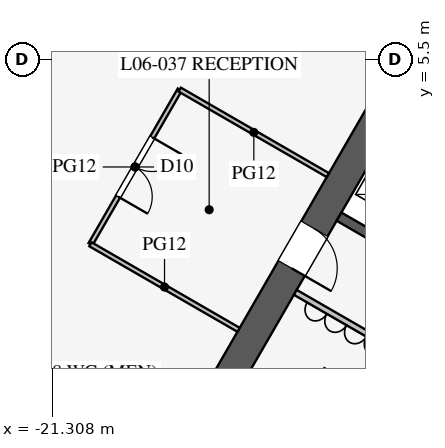
"""IFC4 building model, lengths in metres.
Left out: names, types, materials, properties, quantities, classifications, styles, units other than length and angle.
Written with IfcOpenShell. Run it as: python <this file> out.ifc"""

import sys

from ifc_helpers import new_model, si_unit, direction, frame, frame_2d, origin, place, context, subcontext, project, spatial, rectangle, extrude, element, fill, save


model = new_model("IFC4")
c1 = context("Model", 3, precision=1e-05, world=origin(), true_north=direction((0.0, 1.0)))
c2 = subcontext(c1, "Body", "Model", "MODEL_VIEW")
j1 = project(units=[si_unit("LENGTHUNIT", "METRE"), si_unit("PLANEANGLEUNIT", "RADIAN")], contexts=[c1])
p1 = place(None, origin())
s1 = spatial("IfcSite", under=j1, at=p1, CompositionType="ELEMENT")
p2 = place(p1, origin())
s2 = spatial("IfcBuilding", under=s1, at=p2, CompositionType="ELEMENT")
p3 = place(p2, frame((0.0, 0.0, 29.1)))
s3 = spatial("IfcBuildingStorey", under=s2, at=p3, CompositionType="ELEMENT", Elevation=29.1)
p4 = place(p3, frame((-5.773, 16.0, 0.0), z_axis=(0.0, 0.0, 1.0), x_axis=(-0.500002442456, -0.866023993627, 0.0)))
e1 = element("IfcWall", 1, at=p4, inside=s3, PredefinedType="SHEAR", context=c2, shape_type="SweptSolid", body=[
    extrude(rectangle(XDim=21.939, YDim=0.8, at=frame_2d((10.97, 0.0))), origin(), (0.0, 0.0, 1.0), 4.2),
])
p5 = place(p4, frame((17.27, 0.0, 0.0)))
e2 = element("IfcOpeningElement", 2, at=p5, cuts=e1, PredefinedType="OPENING", context=c2, shape_type="SweptSolid", body=[
    extrude(rectangle(XDim=1.2, YDim=2.1, at=frame_2d((0.6, 1.05))), frame((0.0, 0.41, 0.0), z_axis=(0.0, -1.0, 0.0), x_axis=(1.0, 0.0, 0.0)), (0.0, 0.0, 1.0), 0.82),
])
p6 = place(p4, frame((3.47, 0.0, 0.0)))
e3 = element("IfcOpeningElement", 3, at=p6, cuts=e1, PredefinedType="OPENING", context=c2, shape_type="SweptSolid", body=[
    extrude(rectangle(XDim=1.2, YDim=2.1, at=frame_2d((0.6, 1.05))), frame((0.0, 0.41, 0.0), z_axis=(0.0, -1.0, 0.0), x_axis=(1.0, 0.0, 0.0)), (0.0, 0.0, 1.0), 0.82),
])
p7 = place(p3, frame((-11.532, 0.076, 0.0), z_axis=(0.0, 0.0, 1.0), x_axis=(-0.866005588531, 0.500034319456, 0.0)))
e4 = element("IfcWall", 4, at=p7, inside=s3, PredefinedType="SHEAR", context=c2, shape_type="SweptSolid", body=[
    extrude(rectangle(XDim=2.575, YDim=0.25, at=frame_2d((1.288, 0.0))), origin(), (0.0, 0.0, 1.0), 4.2),
])
p8 = place(p3, frame((-6.663, -1.509, 0.0), z_axis=(0.0, 0.0, 1.0), x_axis=(-0.866019375473, -0.500010441196, 0.0)))
e5 = element("IfcWall", 5, at=p8, inside=s3, PredefinedType="SHEAR", context=c2, shape_type="SweptSolid", body=[
    extrude(rectangle(XDim=9.075, YDim=0.6, at=frame_2d((4.538, 0.0))), origin(), (0.0, 0.0, 1.0), 4.2),
])
p9 = place(p3, frame((-10.495, -3.178, 0.0), z_axis=(0.0, 0.0, 1.0), x_axis=(-0.86602216432, 0.500005610874, 0.0)))
e6 = element("IfcWall", 6, at=p9, inside=s3, PredefinedType="PARTITIONING", context=c2, shape_type="SweptSolid", body=[
    extrude(rectangle(XDim=5.1, YDim=0.15, at=frame_2d((2.55, 0.0))), origin(), (0.0, 0.0, 1.0), 4.0),
])
p10 = place(p9, frame((1.3, 0.0, 0.0)))
e7 = element("IfcOpeningElement", 7, at=p10, cuts=e6, PredefinedType="OPENING", context=c2, shape_type="SweptSolid", body=[
    extrude(rectangle(XDim=0.9, YDim=2.1, at=frame_2d((0.45, 1.05))), frame((0.0, 0.085, 0.0), z_axis=(0.0, -1.0, 0.0), x_axis=(1.0, 0.0, 0.0)), (0.0, 0.0, 1.0), 0.17),
])
p11 = place(p3, frame((-17.952, 4.707, 0.0), z_axis=(0.0, 0.0, 1.0), x_axis=(-0.499977259774, -0.866038532462, 0.0)))
e8 = element("IfcWall", 8, at=p11, inside=s3, PredefinedType="PARTITIONING", context=c2, shape_type="SweptSolid", body=[
    extrude(rectangle(XDim=4.7, YDim=0.12, at=frame_2d((2.35, 0.0))), origin(), (0.0, 0.0, 1.0), 2.9),
])
p12 = place(p11, frame((1.45, 0.0, 0.15)))
e9 = element("IfcOpeningElement", 9, at=p12, cuts=e8, PredefinedType="OPENING", context=c2, shape_type="SweptSolid", body=[
    extrude(rectangle(XDim=1.8, YDim=2.1, at=frame_2d((0.9, 1.05))), frame((0.0, 0.07, 0.0), z_axis=(0.0, -1.0, 0.0), x_axis=(1.0, 0.0, 0.0)), (0.0, 0.0, 1.0), 0.14),
])
p13 = place(p3, frame((-14.055, 2.457, 0.0), z_axis=(0.0, 0.0, 1.0), x_axis=(-0.866031096941, 0.499990139034, 0.0)))
e10 = element("IfcWall", 10, at=p13, inside=s3, PredefinedType="PARTITIONING", context=c2, shape_type="SweptSolid", body=[
    extrude(rectangle(XDim=4.5, YDim=0.12, at=frame_2d((2.25, 0.0))), origin(), (0.0, 0.0, 1.0), 2.9),
])
p14 = place(p3, frame((-16.405, -1.614, 0.0), z_axis=(0.0, 0.0, 1.0), x_axis=(-0.866017533419, 0.500013631625, 0.0)))
e11 = element("IfcWall", 11, at=p14, inside=s3, PredefinedType="PARTITIONING", context=c2, shape_type="SweptSolid", body=[
    extrude(rectangle(XDim=4.5, YDim=0.12, at=frame_2d((2.25, 0.0))), origin(), (0.0, 0.0, 1.0), 2.9),
])
p15 = place(p5, origin())
e12 = element("IfcDoor", 12, at=p15, inside=s3, OperationType="SINGLE_SWING_RIGHT", PredefinedType="DOOR", context=c2, shape_type="SweptSolid", body=[
    extrude(rectangle(XDim=1.2, YDim=2.1, at=frame_2d((0.6, 1.05))), frame((0.0, 0.025, 0.0), z_axis=(0.0, -1.0, 0.0), x_axis=(1.0, 0.0, 0.0)), (0.0, 0.0, 1.0), 0.05),
])
fill(e2, e12)
p16 = place(p12, origin())
e13 = element("IfcDoor", 13, at=p16, inside=s3, OperationType="DOUBLE_DOOR_SINGLE_SWING", PredefinedType="DOOR", context=c2, shape_type="SweptSolid", body=[
    extrude(rectangle(XDim=1.8, YDim=2.1, at=frame_2d((0.9, 1.05))), frame((0.0, 0.025, 0.0), z_axis=(0.0, -1.0, 0.0), x_axis=(1.0, 0.0, 0.0)), (0.0, 0.0, 1.0), 0.05),
])
fill(e9, e13)
save(model, sys.argv[1])
